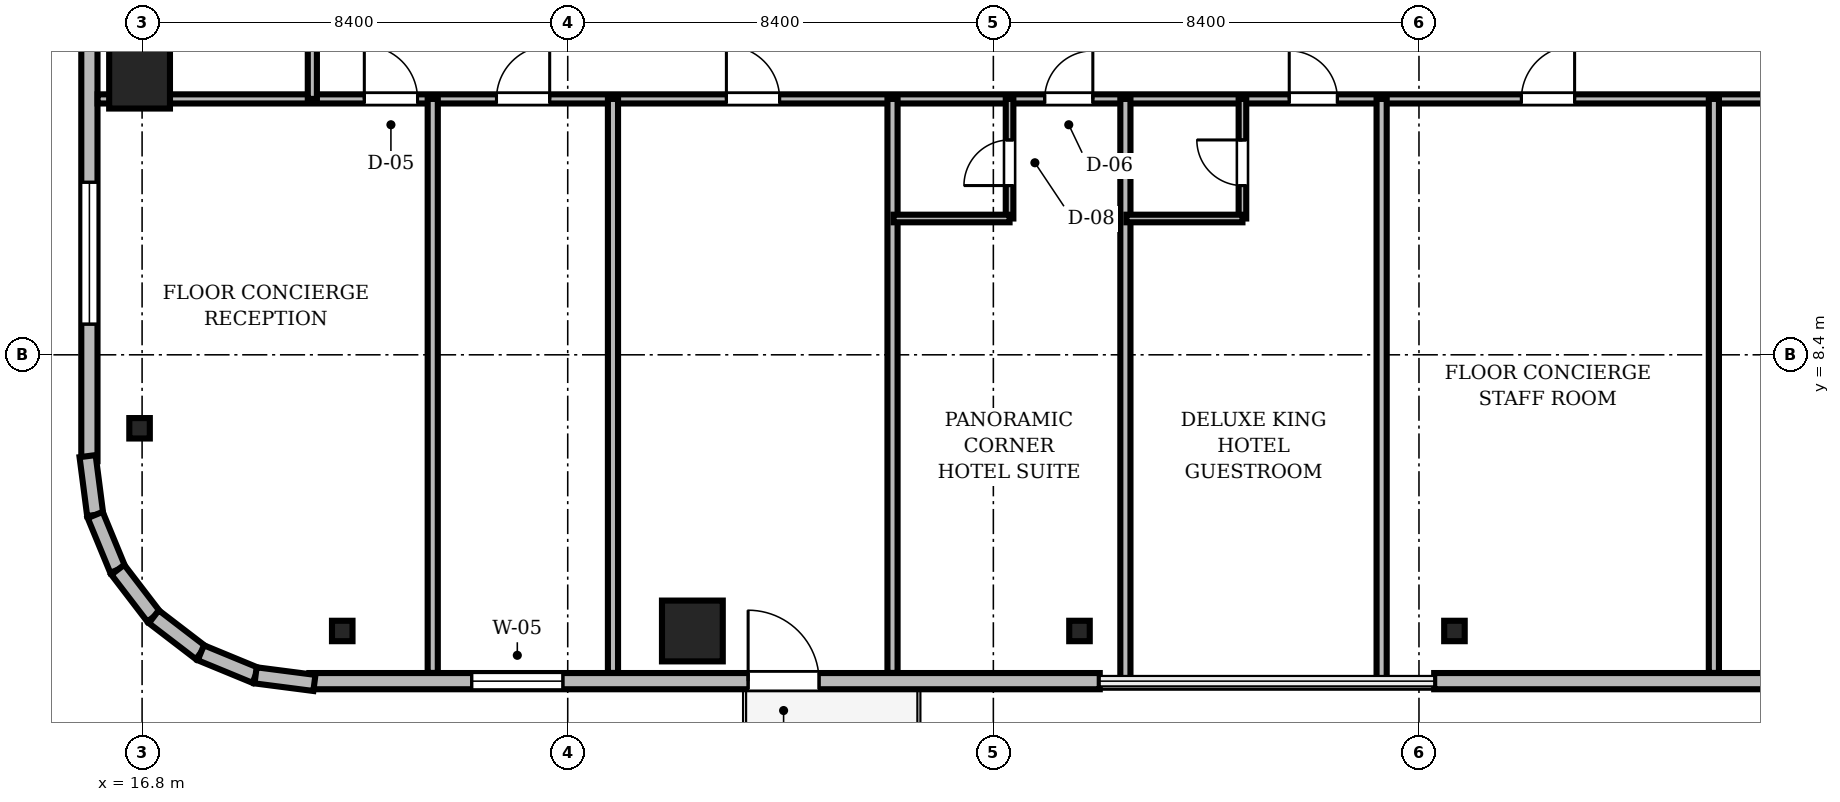
"""IFC4 building model, lengths in metres.
Left out: names, types, materials, properties, quantities, classifications, styles, units other than length and angle.
Written with IfcOpenShell. Run it as: python <this file> out.ifc"""

import sys

from ifc_helpers import new_model, si_unit, direction, frame, frame_2d, origin, origin_2d, place, context, subcontext, project, spatial, rectangle, i_section, extrude, source, transform, mapped, element, fill, save


model = new_model("IFC4")
c1 = context("Model", 3, precision=1e-05, world=origin(), true_north=direction((0.0, 1.0)))
c2 = subcontext(c1, "Body", "Model", "MODEL_VIEW")
j1 = project(units=[si_unit("LENGTHUNIT", "METRE"), si_unit("PLANEANGLEUNIT", "RADIAN")], contexts=[c1])
p1 = place(None, origin())
s1 = spatial("IfcSite", under=j1, at=p1, CompositionType="ELEMENT")
p2 = place(p1, origin())
s2 = spatial("IfcBuilding", under=s1, at=p2, CompositionType="ELEMENT")
p3 = place(p2, frame((0.0, 0.0, 242.7)))
s3 = spatial("IfcBuildingStorey", under=s2, at=p3, CompositionType="ELEMENT", Elevation=242.7)
m1 = source(origin(), c2, "Body", "SweptSolid", [
    extrude(rectangle(XDim=1.2, YDim=1.2, at=origin_2d()), origin(), (0.0, 0.0, 1.0), 3.73),
])
for number, where, z_axis, x_axis in (
    (1, (27.66, 2.95, 0.0), (0.0, 0.0, 1.0), (1.0, 0.0, 0.0)),
    (2, (16.75, 13.86, 0.0), (0.0, 0.0, 1.0), (1.0, 0.0, 0.0)),
):
    element("IfcColumn", number, at=place(p3, frame(where, z_axis=z_axis, x_axis=x_axis)), inside=s3, PredefinedType="COLUMN", context=c2, shape_type="MappedRepresentation", body=[
        mapped(m1, transform((0.0, 0.0, 0.0), scale=1.0)),
    ])
m2 = source(origin(), c2, "Body", "SweptSolid", [
    extrude(i_section(OverallWidth=0.405, OverallDepth=0.403, WebThickness=0.018, FlangeThickness=0.028, FilletRadius=0.015, at=origin_2d()), origin(), (0.0, 0.0, 1.0), 3.73),
])
for number, where, z_axis, x_axis in (
    (3, (20.75, 2.95, 0.0), (0.0, 0.0, 1.0), (1.0, 0.0, 0.0)),
    (4, (35.3, 2.95, 0.0), (0.0, 0.0, 1.0), (1.0, 0.0, 0.0)),
    (5, (42.7, 2.95, 0.0), (0.0, 0.0, 1.0), (1.0, 0.0, 0.0)),
    (6, (16.75, 6.95, 0.0), (0.0, 0.0, 1.0), (1.0, 0.0, 0.0)),
):
    element("IfcColumn", number, at=place(p3, frame(where, z_axis=z_axis, x_axis=x_axis)), inside=s3, PredefinedType="COLUMN", context=c2, shape_type="MappedRepresentation", body=[
        mapped(m2, transform((0.0, 0.0, 0.0), scale=1.0)),
    ])
m3 = source(origin(), c2, "Body", "SweptSolid", [
    extrude(rectangle(XDim=15.6, YDim=0.32, at=frame_2d((7.8, 0.0))), origin(), (0.0, 0.0, 1.0), 3.73),
])
p4 = place(p3, frame((20.1, 1.96, 0.0), z_axis=(0.0, 0.0, 1.0), x_axis=(1.0, 0.0, 0.0)))
e7 = element("IfcWall", 7, at=p4, inside=s3, PredefinedType="SOLIDWALL", context=c2, shape_type="MappedRepresentation", body=[
    mapped(m3, transform((0.0, 0.0, 0.0), scale=1.0)),
])
m4 = source(origin(), c2, "Body", "SweptSolid", [
    extrude(rectangle(XDim=1.4, YDim=2.3, at=frame_2d((0.7, 1.15))), frame((0.0, 0.17, 0.0), z_axis=(0.0, -1.0, 0.0), x_axis=(1.0, 0.0, 0.0)), (0.0, 0.0, 1.0), 0.34),
])
p5 = place(p4, frame((8.66, 0.0, 0.0)))
e8 = element("IfcOpeningElement", 8, at=p5, cuts=e7, PredefinedType="OPENING", context=c2, shape_type="MappedRepresentation", body=[
    mapped(m4, transform((0.0, 0.0, 0.0), scale=1.0)),
])
m5 = source(origin(), c2, "Body", "SweptSolid", [
    extrude(rectangle(XDim=1.8, YDim=2.4, at=frame_2d((0.9, 1.2))), frame((0.0, 0.17, 0.0), z_axis=(0.0, -1.0, 0.0), x_axis=(1.0, 0.0, 0.0)), (0.0, 0.0, 1.0), 0.34),
])
p6 = place(p4, frame((3.205, 0.0, 0.72)))
e9 = element("IfcOpeningElement", 9, at=p6, cuts=e7, PredefinedType="OPENING", context=c2, shape_type="MappedRepresentation", body=[
    mapped(m5, transform((0.0, 0.0, 0.0), scale=1.0)),
])
p7 = place(p3, frame((42.3, 1.96, 0.0), z_axis=(0.0, 0.0, 1.0), x_axis=(1.0, 0.0, 0.0)))
e10 = element("IfcWall", 10, at=p7, inside=s3, PredefinedType="SOLIDWALL", context=c2, shape_type="MappedRepresentation", body=[
    mapped(m3, transform((0.0, 0.0, 0.0), scale=1.0)),
])
m6 = source(origin(), c2, "Body", "SweptSolid", [
    extrude(rectangle(XDim=2.8, YDim=2.4, at=frame_2d((1.4, 1.2))), frame((0.0, 0.17, 0.0), z_axis=(0.0, -1.0, 0.0), x_axis=(1.0, 0.0, 0.0)), (0.0, 0.0, 1.0), 0.34),
])
p8 = place(p7, frame((10.095, 0.0, 0.72)))
e11 = element("IfcOpeningElement", 11, at=p8, cuts=e10, PredefinedType="OPENING", context=c2, shape_type="MappedRepresentation", body=[
    mapped(m6, transform((0.0, 0.0, 0.0), scale=1.0)),
])
p9 = place(p3, frame((15.76, 21.9, 0.0), z_axis=(0.0, 0.0, 1.0), x_axis=(0.0, -1.0, 0.0)))
e12 = element("IfcWall", 12, at=p9, inside=s3, PredefinedType="SOLIDWALL", context=c2, shape_type="MappedRepresentation", body=[
    mapped(m3, transform((0.0, 0.0, 0.0), scale=1.0)),
])
p10 = place(p9, frame((10.095, 0.0, 0.72)))
e13 = element("IfcOpeningElement", 13, at=p10, cuts=e12, PredefinedType="OPENING", context=c2, shape_type="MappedRepresentation", body=[
    mapped(m6, transform((0.0, 0.0, 0.0), scale=1.0)),
])
m7 = source(origin(), c2, "Body", "SweptSolid", [
    extrude(rectangle(XDim=1.171, YDim=0.32, at=frame_2d((0.585, 0.0))), origin(), (0.0, 0.0, 1.0), 3.73),
])
p11 = place(p3, frame((15.724, 6.401, 0.0), z_axis=(0.0, 0.0, 1.0), x_axis=(0.128269133229, -0.991739395941, 0.0)))
e14 = element("IfcWall", 14, at=p11, inside=s3, PredefinedType="SOLIDWALL", context=c2, shape_type="MappedRepresentation", body=[
    mapped(m7, transform((0.0, 0.0, 0.0), scale=1.0)),
])
m8 = source(origin(), c2, "Body", "SweptSolid", [
    extrude(rectangle(XDim=1.169, YDim=0.32, at=frame_2d((0.584, 0.0))), origin(), (0.0, 0.0, 1.0), 3.73),
])
for number, where, z_axis, x_axis in (
    (15, (15.875, 5.24, 0.0), (0.0, 0.0, 1.0), (0.381, -0.925, 0.0)),
    (16, (16.32, 4.159, 0.0), (0.0, 0.0, 1.0), (0.608, -0.794, 0.0)),
):
    element("IfcWall", number, at=place(p3, frame(where, z_axis=z_axis, x_axis=x_axis)), inside=s3, PredefinedType="SOLIDWALL", context=c2, shape_type="MappedRepresentation", body=[
        mapped(m8, transform((0.0, 0.0, 0.0), scale=1.0)),
    ])
m9 = source(origin(), c2, "Body", "SweptSolid", [
    extrude(rectangle(XDim=1.169, YDim=0.32, at=frame_2d((0.584, 0.0))), origin(), (0.0, 0.0, 1.0), 3.73),
])
p12 = place(p3, frame((17.031, 3.231, 0.0), z_axis=(0.0, 0.0, 1.0), x_axis=(0.793663520347, -0.608356981114, 0.0)))
e17 = element("IfcWall", 17, at=p12, inside=s3, PredefinedType="SOLIDWALL", context=c2, shape_type="MappedRepresentation", body=[
    mapped(m9, transform((0.0, 0.0, 0.0), scale=1.0)),
])
m10 = source(origin(), c2, "Body", "SweptSolid", [
    extrude(rectangle(XDim=1.169, YDim=0.32, at=frame_2d((0.585, 0.0))), origin(), (0.0, 0.0, 1.0), 3.73),
])
p13 = place(p3, frame((17.959, 2.52, 0.0), z_axis=(0.0, 0.0, 1.0), x_axis=(0.924479075121, -0.381232789334, 0.0)))
e18 = element("IfcWall", 18, at=p13, inside=s3, PredefinedType="SOLIDWALL", context=c2, shape_type="MappedRepresentation", body=[
    mapped(m10, transform((0.0, 0.0, 0.0), scale=1.0)),
])
m11 = source(origin(), c2, "Body", "SweptSolid", [
    extrude(rectangle(XDim=1.17, YDim=0.32, at=frame_2d((0.585, 0.0))), origin(), (0.0, 0.0, 1.0), 3.73),
])
p14 = place(p3, frame((19.04, 2.074, 0.0), z_axis=(0.0, 0.0, 1.0), x_axis=(0.991762485493, -0.128090485085, 0.0)))
e19 = element("IfcWall", 19, at=p14, inside=s3, PredefinedType="SOLIDWALL", context=c2, shape_type="MappedRepresentation", body=[
    mapped(m11, transform((0.0, 0.0, 0.0), scale=1.0)),
])
m12 = source(origin(), c2, "Body", "SweptSolid", [
    extrude(rectangle(XDim=46.156, YDim=0.18, at=frame_2d((23.078, 0.0))), origin(), (0.0, 0.0, 1.0), 2.972),
])
p15 = place(p3, frame((15.922, 13.45, 0.0), z_axis=(0.0, 0.0, 1.0), x_axis=(1.0, 0.0, 0.0)))
e20 = element("IfcWall", 20, at=p15, inside=s3, PredefinedType="PARTITIONING", context=c2, shape_type="MappedRepresentation", body=[
    mapped(m12, transform((0.0, 0.0, 0.0), scale=1.0)),
])
m13 = source(origin(), c2, "Body", "SweptSolid", [
    extrude(rectangle(XDim=1.05, YDim=2.2, at=frame_2d((0.525, 1.1))), frame((0.0, 0.1, 0.0), z_axis=(0.0, -1.0, 0.0), x_axis=(1.0, 0.0, 0.0)), (0.0, 0.0, 1.0), 0.2),
])
p16 = place(p15, frame((5.264, 0.0, 0.0)))
e21 = element("IfcOpeningElement", 21, at=p16, cuts=e20, PredefinedType="OPENING", context=c2, shape_type="MappedRepresentation", body=[
    mapped(m13, transform((0.0, 0.0, 0.0), scale=1.0)),
])
p17 = place(p15, frame((7.872, 0.0, 0.0)))
e22 = element("IfcOpeningElement", 22, at=p17, cuts=e20, PredefinedType="OPENING", context=c2, shape_type="MappedRepresentation", body=[
    mapped(m13, transform((0.0, 0.0, 0.0), scale=1.0)),
])
p18 = place(p15, frame((12.409, 0.0, 0.0)))
e23 = element("IfcOpeningElement", 23, at=p18, cuts=e20, PredefinedType="OPENING", context=c2, shape_type="MappedRepresentation", body=[
    mapped(m13, transform((0.0, 0.0, 0.0), scale=1.0)),
])
m14 = source(origin(), c2, "Body", "SweptSolid", [
    extrude(rectangle(XDim=0.95, YDim=2.15, at=frame_2d((0.475, 1.075))), frame((0.0, 0.1, 0.0), z_axis=(0.0, -1.0, 0.0), x_axis=(1.0, 0.0, 0.0)), (0.0, 0.0, 1.0), 0.2),
])
p19 = place(p15, frame((18.691, 0.0, 0.0)))
e24 = element("IfcOpeningElement", 24, at=p19, cuts=e20, PredefinedType="OPENING", context=c2, shape_type="MappedRepresentation", body=[
    mapped(m14, transform((0.0, 0.0, 0.0), scale=1.0)),
])
p20 = place(p15, frame((23.518, 0.0, 0.0)))
e25 = element("IfcOpeningElement", 25, at=p20, cuts=e20, PredefinedType="OPENING", context=c2, shape_type="MappedRepresentation", body=[
    mapped(m14, transform((0.0, 0.0, 0.0), scale=1.0)),
])
p21 = place(p15, frame((28.1, 0.0, 0.0)))
e26 = element("IfcOpeningElement", 26, at=p21, cuts=e20, PredefinedType="OPENING", context=c2, shape_type="MappedRepresentation", body=[
    mapped(m13, transform((0.0, 0.0, 0.0), scale=1.0)),
])
p22 = place(p15, frame((32.998, 0.0, 0.0)))
e27 = element("IfcOpeningElement", 27, at=p22, cuts=e20, PredefinedType="OPENING", context=c2, shape_type="MappedRepresentation", body=[
    mapped(m13, transform((0.0, 0.0, 0.0), scale=1.0)),
])
m15 = source(origin(), c2, "Body", "SweptSolid", [
    extrude(rectangle(XDim=15.1, YDim=0.18, at=frame_2d((7.55, 0.0))), origin(), (0.0, 0.0, 1.0), 3.172),
])
p23 = place(p3, frame((20.16, 13.45, 0.0), z_axis=(0.0, 0.0, 1.0), x_axis=(0.0, 1.0, 0.0)))
e28 = element("IfcWall", 28, at=p23, inside=s3, PredefinedType="PARTITIONING", context=c2, shape_type="MappedRepresentation", body=[
    mapped(m15, transform((0.0, 0.0, 0.0), scale=1.0)),
])
p24 = place(p23, frame((3.218, 0.0, 0.0)))
e29 = element("IfcOpeningElement", 29, at=p24, cuts=e28, PredefinedType="OPENING", context=c2, shape_type="MappedRepresentation", body=[
    mapped(m13, transform((0.0, 0.0, 0.0), scale=1.0)),
])
p25 = place(p23, frame((11.917, 0.0, 0.0)))
e30 = element("IfcOpeningElement", 30, at=p25, cuts=e28, PredefinedType="OPENING", context=c2, shape_type="MappedRepresentation", body=[
    mapped(m14, transform((0.0, 0.0, 0.0), scale=1.0)),
])
m16 = source(origin(), c2, "Body", "SweptSolid", [
    extrude(rectangle(XDim=2.36, YDim=0.15, at=frame_2d((1.18, 0.0))), origin(), (0.0, 0.0, 1.0), 3.422),
])
p26 = place(p3, frame((33.92, 11.09, 0.0), z_axis=(0.0, 0.0, 1.0), x_axis=(0.0, 1.0, 0.0)))
e31 = element("IfcWall", 31, at=p26, inside=s3, PredefinedType="PARTITIONING", context=c2, shape_type="MappedRepresentation", body=[
    mapped(m16, transform((0.0, 0.0, 0.0), scale=1.0)),
])
m17 = source(origin(), c2, "Body", "SweptSolid", [
    extrude(rectangle(XDim=0.9, YDim=2.1, at=frame_2d((0.45, 1.05))), frame((0.0, 0.085, 0.0), z_axis=(0.0, -1.0, 0.0), x_axis=(1.0, 0.0, 0.0)), (0.0, 0.0, 1.0), 0.17),
])
p27 = place(p26, frame((0.65, 0.0, 0.0)))
e32 = element("IfcOpeningElement", 32, at=p27, cuts=e31, PredefinedType="OPENING", context=c2, shape_type="MappedRepresentation", body=[
    mapped(m17, transform((0.0, 0.0, 0.0), scale=1.0)),
])
m18 = source(origin(), c2, "Body", "SweptSolid", [
    extrude(rectangle(XDim=2.36, YDim=0.15, at=frame_2d((1.18, 0.0))), origin(), (0.0, 0.0, 1.0), 3.172),
])
p28 = place(p3, frame((38.516, 11.09, 0.0), z_axis=(0.0, 0.0, 1.0), x_axis=(0.0, 1.0, 0.0)))
e33 = element("IfcWall", 33, at=p28, inside=s3, PredefinedType="PARTITIONING", context=c2, shape_type="MappedRepresentation", body=[
    mapped(m18, transform((0.0, 0.0, 0.0), scale=1.0)),
])
p29 = place(p28, frame((0.65, 0.0, 0.0)))
e34 = element("IfcOpeningElement", 34, at=p29, cuts=e33, PredefinedType="OPENING", context=c2, shape_type="MappedRepresentation", body=[
    mapped(m17, transform((0.0, 0.0, 0.0), scale=1.0)),
])
m19 = source(origin(), c2, "Body", "SweptSolid", [
    extrude(rectangle(XDim=11.328, YDim=0.2, at=frame_2d((5.664, 0.0))), origin(), (0.0, 0.0, 1.0), 2.972),
])
for number, where, z_axis, x_axis in (
    (35, (22.536, 2.122, 0.0), (0.0, 0.0, 1.0), (0.0, 1.0, 0.0)),
    (36, (26.093, 2.122, 0.0), (0.0, 0.0, 1.0), (0.0, 1.0, 0.0)),
    (37, (31.61, 2.122, 0.0), (0.0, 0.0, 1.0), (0.0, 1.0, 0.0)),
):
    element("IfcWall", number, at=place(p3, frame(where, z_axis=z_axis, x_axis=x_axis)), inside=s3, PredefinedType="PARTITIONING", context=c2, shape_type="MappedRepresentation", body=[
        mapped(m19, transform((0.0, 0.0, 0.0), scale=1.0)),
    ])
m20 = source(origin(), c2, "Body", "SweptSolid", [
    extrude(rectangle(XDim=11.52, YDim=0.2, at=frame_2d((5.76, 0.0))), origin(), (0.0, 0.0, 1.0), 2.972),
])
for number, where, z_axis, x_axis in (
    (38, (36.206, 1.93, 0.0), (0.0, 0.0, 1.0), (0.0, 1.0, 0.0)),
    (39, (41.263, 1.93, 0.0), (0.0, 0.0, 1.0), (0.0, 1.0, 0.0)),
):
    element("IfcWall", number, at=place(p3, frame(where, z_axis=z_axis, x_axis=x_axis)), inside=s3, PredefinedType="PARTITIONING", context=c2, shape_type="MappedRepresentation", body=[
        mapped(m20, transform((0.0, 0.0, 0.0), scale=1.0)),
    ])
p30 = place(p3, frame((47.82, 2.122, 0.0), z_axis=(0.0, 0.0, 1.0), x_axis=(0.0, 1.0, 0.0)))
e40 = element("IfcWall", 40, at=p30, inside=s3, PredefinedType="PARTITIONING", context=c2, shape_type="MappedRepresentation", body=[
    mapped(m19, transform((0.0, 0.0, 0.0), scale=1.0)),
])
m21 = source(origin(), c2, "Body", "SweptSolid", [
    extrude(rectangle(XDim=2.29, YDim=0.15, at=frame_2d((1.145, 0.0))), origin(), (0.0, 0.0, 1.0), 3.172),
])
p31 = place(p3, frame((31.63, 11.09, 0.0), z_axis=(0.0, 0.0, 1.0), x_axis=(1.0, 0.0, 0.0)))
e41 = element("IfcWall", 41, at=p31, inside=s3, PredefinedType="PARTITIONING", context=c2, shape_type="MappedRepresentation", body=[
    mapped(m21, transform((0.0, 0.0, 0.0), scale=1.0)),
])
m22 = source(origin(), c2, "Body", "SweptSolid", [
    extrude(rectangle(XDim=2.29, YDim=0.15, at=frame_2d((1.145, 0.0))), origin(), (0.0, 0.0, 1.0), 3.73),
])
p32 = place(p3, frame((36.226, 11.09, 0.0), z_axis=(0.0, 0.0, 1.0), x_axis=(1.0, 0.0, 0.0)))
e42 = element("IfcWall", 42, at=p32, inside=s3, PredefinedType="PARTITIONING", context=c2, shape_type="MappedRepresentation", body=[
    mapped(m22, transform((0.0, 0.0, 0.0), scale=1.0)),
])
m23 = source(origin(), c2, "Body", "SweptSolid", [
    extrude(rectangle(XDim=1.4, YDim=2.3, at=frame_2d((0.7, 1.15))), frame((0.0, 0.025, 0.0), z_axis=(0.0, -1.0, 0.0), x_axis=(1.0, 0.0, 0.0)), (0.0, 0.0, 1.0), 0.05),
])
p33 = place(p5, frame((1.4, 0.0, 0.0), z_axis=(0.0, 0.0, 1.0), x_axis=(-1.0, 0.0, 0.0)))
e43 = element("IfcDoor", 43, at=p33, inside=s3, OperationType="DOUBLE_DOOR_SLIDING", PredefinedType="DOOR", context=c2, shape_type="MappedRepresentation", body=[
    mapped(m23, transform((0.0, 0.0, 0.0), scale=1.0)),
])
fill(e8, e43)
m24 = source(origin(), c2, "Body", "SweptSolid", [
    extrude(rectangle(XDim=1.8, YDim=2.4, at=frame_2d((0.9, 1.2))), frame((0.0, 0.03, 0.0), z_axis=(0.0, -1.0, 0.0), x_axis=(1.0, 0.0, 0.0)), (0.0, 0.0, 1.0), 0.06),
])
p34 = place(p6, origin())
e44 = element("IfcWindow", 44, at=p34, inside=s3, PartitioningType="SINGLE_PANEL", PredefinedType="WINDOW", context=c2, shape_type="MappedRepresentation", body=[
    mapped(m24, transform((0.0, 0.0, 0.0), scale=1.0)),
])
fill(e9, e44)
m25 = source(origin(), c2, "Body", "SweptSolid", [
    extrude(rectangle(XDim=2.8, YDim=2.4, at=frame_2d((1.4, 1.2))), frame((0.0, 0.03, 0.0), z_axis=(0.0, -1.0, 0.0), x_axis=(1.0, 0.0, 0.0)), (0.0, 0.0, 1.0), 0.06),
])
p35 = place(p10, origin())
e45 = element("IfcWindow", 45, at=p35, inside=s3, PartitioningType="SINGLE_PANEL", PredefinedType="WINDOW", context=c2, shape_type="MappedRepresentation", body=[
    mapped(m25, transform((0.0, 0.0, 0.0), scale=1.0)),
])
fill(e13, e45)
m26 = source(origin(), c2, "Body", "SweptSolid", [
    extrude(rectangle(XDim=1.05, YDim=2.2, at=frame_2d((0.525, 1.1))), frame((0.0, 0.025, 0.0), z_axis=(0.0, -1.0, 0.0), x_axis=(1.0, 0.0, 0.0)), (0.0, 0.0, 1.0), 0.05),
])
p36 = place(p16, origin())
e46 = element("IfcDoor", 46, at=p36, inside=s3, OperationType="SINGLE_SWING_LEFT", PredefinedType="DOOR", context=c2, shape_type="MappedRepresentation", body=[
    mapped(m26, transform((0.0, 0.0, 0.0), scale=1.0)),
])
fill(e21, e46)
p37 = place(p17, origin())
e47 = element("IfcDoor", 47, at=p37, inside=s3, OperationType="SINGLE_SWING_RIGHT", PredefinedType="DOOR", context=c2, shape_type="MappedRepresentation", body=[
    mapped(m26, transform((0.0, 0.0, 0.0), scale=1.0)),
])
fill(e22, e47)
p38 = place(p18, origin())
e48 = element("IfcDoor", 48, at=p38, inside=s3, OperationType="SINGLE_SWING_LEFT", PredefinedType="DOOR", context=c2, shape_type="MappedRepresentation", body=[
    mapped(m26, transform((0.0, 0.0, 0.0), scale=1.0)),
])
fill(e23, e48)
m27 = source(origin(), c2, "Body", "SweptSolid", [
    extrude(rectangle(XDim=0.95, YDim=2.15, at=frame_2d((0.475, 1.075))), frame((0.0, 0.025, 0.0), z_axis=(0.0, -1.0, 0.0), x_axis=(1.0, 0.0, 0.0)), (0.0, 0.0, 1.0), 0.05),
])
p39 = place(p19, origin())
e49 = element("IfcDoor", 49, at=p39, inside=s3, OperationType="SINGLE_SWING_RIGHT", PredefinedType="DOOR", context=c2, shape_type="MappedRepresentation", body=[
    mapped(m27, transform((0.0, 0.0, 0.0), scale=1.0)),
])
fill(e24, e49)
p40 = place(p20, origin())
e50 = element("IfcDoor", 50, at=p40, inside=s3, OperationType="SINGLE_SWING_LEFT", PredefinedType="DOOR", context=c2, shape_type="MappedRepresentation", body=[
    mapped(m27, transform((0.0, 0.0, 0.0), scale=1.0)),
])
fill(e25, e50)
p41 = place(p21, origin())
e51 = element("IfcDoor", 51, at=p41, inside=s3, OperationType="SINGLE_SWING_RIGHT", PredefinedType="DOOR", context=c2, shape_type="MappedRepresentation", body=[
    mapped(m26, transform((0.0, 0.0, 0.0), scale=1.0)),
])
fill(e26, e51)
m28 = source(origin(), c2, "Body", "SweptSolid", [
    extrude(rectangle(XDim=0.9, YDim=2.1, at=frame_2d((0.45, 1.05))), frame((0.0, 0.025, 0.0), z_axis=(0.0, -1.0, 0.0), x_axis=(1.0, 0.0, 0.0)), (0.0, 0.0, 1.0), 0.05),
])
p42 = place(p27, origin())
e52 = element("IfcDoor", 52, at=p42, inside=s3, OperationType="SINGLE_SWING_LEFT", PredefinedType="DOOR", context=c2, shape_type="MappedRepresentation", body=[
    mapped(m28, transform((0.0, 0.0, 0.0), scale=1.0)),
])
fill(e32, e52)
p43 = place(p29, origin())
e53 = element("IfcDoor", 53, at=p43, inside=s3, OperationType="SINGLE_SWING_RIGHT", PredefinedType="DOOR", context=c2, shape_type="MappedRepresentation", body=[
    mapped(m28, transform((0.0, 0.0, 0.0), scale=1.0)),
])
fill(e34, e53)
save(model, sys.argv[1])
